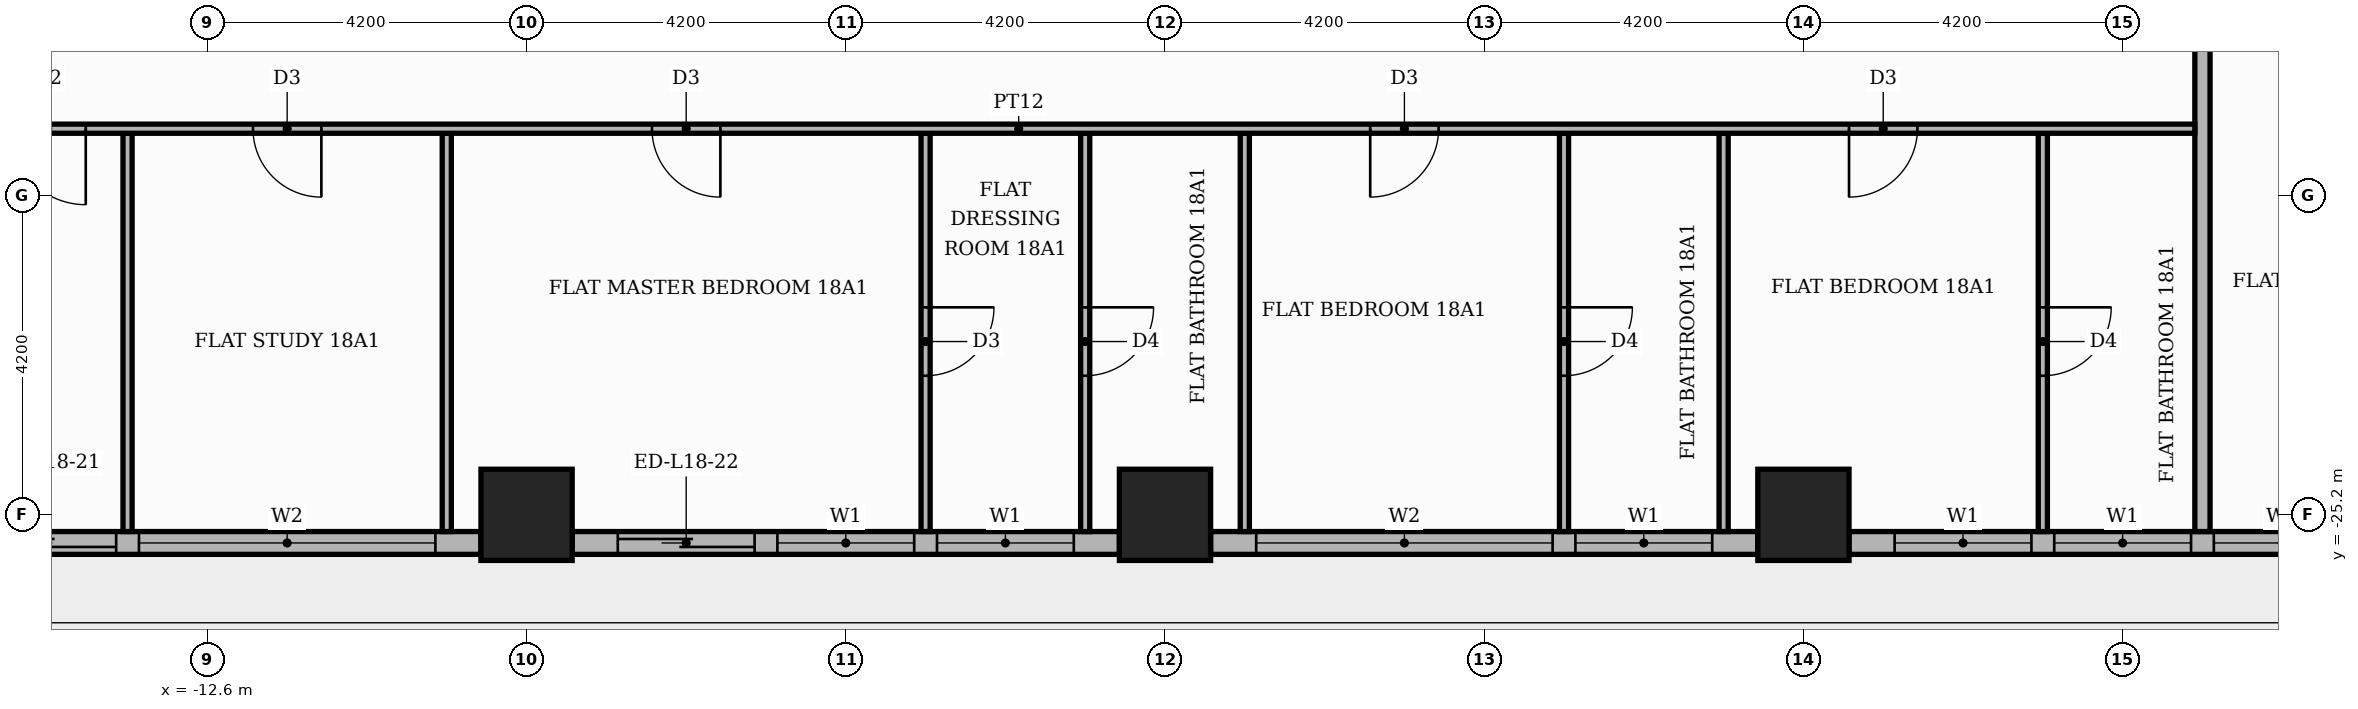
"""IFC4 building model, lengths in metres.
Left out: names, types, materials, properties, quantities, classifications, styles, units other than length and angle.
Written with IfcOpenShell. Run it as: python <this file> out.ifc"""

import sys

from ifc_helpers import new_model, si_unit, direction, frame, frame_2d, origin, origin_2d, place, context, subcontext, project, spatial, rectangle, extrude, element, fill, save


model = new_model("IFC4")
c1 = context("Model", 3, precision=1e-05, world=origin(), true_north=direction((0.0, 1.0)))
c2 = subcontext(c1, "Body", "Model", "MODEL_VIEW")
j1 = project(units=[si_unit("LENGTHUNIT", "METRE"), si_unit("PLANEANGLEUNIT", "RADIAN")], contexts=[c1])
p1 = place(None, origin())
s1 = spatial("IfcSite", under=j1, at=p1, CompositionType="ELEMENT")
p2 = place(p1, origin())
s2 = spatial("IfcBuilding", under=s1, at=p2, CompositionType="ELEMENT")
p3 = place(p2, frame((0.0, 0.0, 79.2)))
s3 = spatial("IfcBuildingStorey", under=s2, at=p3, CompositionType="ELEMENT", Elevation=79.2)
for number, where, z_axis, x_axis in (
    (1, (0.0, -25.2, -0.42), (0.0, 0.0, 1.0), (1.0, 0.0, 0.0)),
    (2, (8.4, -25.2, -0.42), (0.0, 0.0, 1.0), (1.0, 0.0, 0.0)),
    (3, (-8.4, -25.2, -0.42), (0.0, 0.0, 1.0), (1.0, 0.0, 0.0)),
):
    element("IfcColumn", number, at=place(p3, frame(where, z_axis=z_axis, x_axis=x_axis)), inside=s3, PredefinedType="COLUMN", context=c2, shape_type="SweptSolid", body=[
        extrude(rectangle(XDim=1.2, YDim=1.2, at=origin_2d()), origin(), (0.0, 0.0, 1.0), 4.32),
    ])
p4 = place(p3, frame((-16.2, -25.57, 0.0), z_axis=(0.0, 0.0, 1.0), x_axis=(1.0, 0.0, 0.0)))
e4 = element("IfcWall", 4, at=p4, inside=s3, PredefinedType="STANDARD", context=c2, shape_type="SweptSolid", body=[
    extrude(rectangle(XDim=7.2, YDim=0.3, at=frame_2d((3.6, 0.0))), origin(), (0.0, 0.0, 1.0), 3.48),
])
p5 = place(p4, frame((0.6, 0.0, 0.0)))
e5 = element("IfcOpeningElement", 5, at=p5, cuts=e4, PredefinedType="OPENING", context=c2, shape_type="SweptSolid", body=[
    extrude(rectangle(XDim=1.8, YDim=2.4, at=frame_2d((0.9, 1.2))), frame((0.0, 0.16, 0.0), z_axis=(0.0, -1.0, 0.0), x_axis=(1.0, 0.0, 0.0)), (0.0, 0.0, 1.0), 0.32),
])
p6 = place(p4, frame((2.7, 0.0, 0.9)))
e6 = element("IfcOpeningElement", 6, at=p6, cuts=e4, PredefinedType="OPENING", context=c2, shape_type="SweptSolid", body=[
    extrude(rectangle(XDim=3.9, YDim=2.1, at=frame_2d((1.95, 1.05))), frame((0.0, 0.16, 0.0), z_axis=(0.0, -1.0, 0.0), x_axis=(1.0, 0.0, 0.0)), (0.0, 0.0, 1.0), 0.32),
])
p7 = place(p3, frame((-7.8, -25.57, 0.0), z_axis=(0.0, 0.0, 1.0), x_axis=(1.0, 0.0, 0.0)))
e7 = element("IfcWall", 7, at=p7, inside=s3, PredefinedType="STANDARD", context=c2, shape_type="SweptSolid", body=[
    extrude(rectangle(XDim=7.2, YDim=0.3, at=frame_2d((3.6, 0.0))), origin(), (0.0, 0.0, 1.0), 3.48),
])
p8 = place(p7, frame((0.6, 0.0, 0.0)))
e8 = element("IfcOpeningElement", 8, at=p8, cuts=e7, PredefinedType="OPENING", context=c2, shape_type="SweptSolid", body=[
    extrude(rectangle(XDim=1.8, YDim=2.4, at=frame_2d((0.9, 1.2))), frame((0.0, 0.16, 0.0), z_axis=(0.0, -1.0, 0.0), x_axis=(1.0, 0.0, 0.0)), (0.0, 0.0, 1.0), 0.32),
])
p9 = place(p7, frame((2.7, 0.0, 0.9)))
e9 = element("IfcOpeningElement", 9, at=p9, cuts=e7, PredefinedType="OPENING", context=c2, shape_type="SweptSolid", body=[
    extrude(rectangle(XDim=1.8, YDim=2.1, at=frame_2d((0.9, 1.05))), frame((0.0, 0.16, 0.0), z_axis=(0.0, -1.0, 0.0), x_axis=(1.0, 0.0, 0.0)), (0.0, 0.0, 1.0), 0.32),
])
p10 = place(p7, frame((4.8, 0.0, 0.9)))
e10 = element("IfcOpeningElement", 10, at=p10, cuts=e7, PredefinedType="OPENING", context=c2, shape_type="SweptSolid", body=[
    extrude(rectangle(XDim=1.8, YDim=2.1, at=frame_2d((0.9, 1.05))), frame((0.0, 0.16, 0.0), z_axis=(0.0, -1.0, 0.0), x_axis=(1.0, 0.0, 0.0)), (0.0, 0.0, 1.0), 0.32),
])
p11 = place(p3, frame((0.6, -25.57, 0.0), z_axis=(0.0, 0.0, 1.0), x_axis=(1.0, 0.0, 0.0)))
e11 = element("IfcWall", 11, at=p11, inside=s3, PredefinedType="STANDARD", context=c2, shape_type="SweptSolid", body=[
    extrude(rectangle(XDim=7.2, YDim=0.3, at=frame_2d((3.6, 0.0))), origin(), (0.0, 0.0, 1.0), 3.48),
])
p12 = place(p11, frame((0.6, 0.0, 0.9)))
e12 = element("IfcOpeningElement", 12, at=p12, cuts=e11, PredefinedType="OPENING", context=c2, shape_type="SweptSolid", body=[
    extrude(rectangle(XDim=3.9, YDim=2.1, at=frame_2d((1.95, 1.05))), frame((0.0, 0.16, 0.0), z_axis=(0.0, -1.0, 0.0), x_axis=(1.0, 0.0, 0.0)), (0.0, 0.0, 1.0), 0.32),
])
p13 = place(p11, frame((4.8, 0.0, 0.9)))
e13 = element("IfcOpeningElement", 13, at=p13, cuts=e11, PredefinedType="OPENING", context=c2, shape_type="SweptSolid", body=[
    extrude(rectangle(XDim=1.8, YDim=2.1, at=frame_2d((0.9, 1.05))), frame((0.0, 0.16, 0.0), z_axis=(0.0, -1.0, 0.0), x_axis=(1.0, 0.0, 0.0)), (0.0, 0.0, 1.0), 0.32),
])
p14 = place(p3, frame((9.0, -25.57, 0.0), z_axis=(0.0, 0.0, 1.0), x_axis=(1.0, 0.0, 0.0)))
e14 = element("IfcWall", 14, at=p14, inside=s3, PredefinedType="STANDARD", context=c2, shape_type="SweptSolid", body=[
    extrude(rectangle(XDim=7.2, YDim=0.3, at=frame_2d((3.6, 0.0))), origin(), (0.0, 0.0, 1.0), 3.48),
])
p15 = place(p14, frame((0.6, 0.0, 0.9)))
e15 = element("IfcOpeningElement", 15, at=p15, cuts=e14, PredefinedType="OPENING", context=c2, shape_type="SweptSolid", body=[
    extrude(rectangle(XDim=1.8, YDim=2.1, at=frame_2d((0.9, 1.05))), frame((0.0, 0.16, 0.0), z_axis=(0.0, -1.0, 0.0), x_axis=(1.0, 0.0, 0.0)), (0.0, 0.0, 1.0), 0.32),
])
p16 = place(p14, frame((2.7, 0.0, 0.9)))
e16 = element("IfcOpeningElement", 16, at=p16, cuts=e14, PredefinedType="OPENING", context=c2, shape_type="SweptSolid", body=[
    extrude(rectangle(XDim=1.8, YDim=2.1, at=frame_2d((0.9, 1.05))), frame((0.0, 0.16, 0.0), z_axis=(0.0, -1.0, 0.0), x_axis=(1.0, 0.0, 0.0)), (0.0, 0.0, 1.0), 0.32),
])
p17 = place(p14, frame((4.8, 0.0, 0.9)))
e17 = element("IfcOpeningElement", 17, at=p17, cuts=e14, PredefinedType="OPENING", context=c2, shape_type="SweptSolid", body=[
    extrude(rectangle(XDim=1.8, YDim=2.1, at=frame_2d((0.9, 1.05))), frame((0.0, 0.16, 0.0), z_axis=(0.0, -1.0, 0.0), x_axis=(1.0, 0.0, 0.0)), (0.0, 0.0, 1.0), 0.32),
])
for number, where, z_axis, x_axis in (
    (18, (-13.65, -25.42, 0.0), (0.0, 0.0, 1.0), (0.0, 1.0, 0.0)),
    (19, (-9.45, -25.42, 0.0), (0.0, 0.0, 1.0), (0.0, 1.0, 0.0)),
):
    element("IfcWall", number, at=place(p3, frame(where, z_axis=z_axis, x_axis=x_axis)), inside=s3, PredefinedType="PARTITIONING", context=c2, shape_type="SweptSolid", body=[
        extrude(rectangle(XDim=5.24, YDim=0.12, at=frame_2d((2.62, 0.0))), origin(), (0.0, 0.0, 1.0), 3.48),
    ])
p18 = place(p3, frame((-3.15, -25.42, 0.0), z_axis=(0.0, 0.0, 1.0), x_axis=(0.0, 1.0, 0.0)))
e20 = element("IfcWall", 20, at=p18, inside=s3, PredefinedType="PARTITIONING", context=c2, shape_type="SweptSolid", body=[
    extrude(rectangle(XDim=5.24, YDim=0.12, at=frame_2d((2.62, 0.0))), origin(), (0.0, 0.0, 1.0), 3.48),
])
p19 = place(p18, frame((2.05, 0.0, 0.0)))
e21 = element("IfcOpeningElement", 21, at=p19, cuts=e20, PredefinedType="OPENING", context=c2, shape_type="SweptSolid", body=[
    extrude(rectangle(XDim=0.9, YDim=2.1, at=frame_2d((0.45, 1.05))), frame((0.0, 0.07, 0.0), z_axis=(0.0, -1.0, 0.0), x_axis=(1.0, 0.0, 0.0)), (0.0, 0.0, 1.0), 0.14),
])
p20 = place(p3, frame((-1.05, -25.42, 0.0), z_axis=(0.0, 0.0, 1.0), x_axis=(0.0, 1.0, 0.0)))
e22 = element("IfcWall", 22, at=p20, inside=s3, PredefinedType="PARTITIONING", context=c2, shape_type="SweptSolid", body=[
    extrude(rectangle(XDim=5.24, YDim=0.12, at=frame_2d((2.62, 0.0))), origin(), (0.0, 0.0, 1.0), 3.48),
])
p21 = place(p20, frame((2.05, 0.0, 0.0)))
e23 = element("IfcOpeningElement", 23, at=p21, cuts=e22, PredefinedType="OPENING", context=c2, shape_type="SweptSolid", body=[
    extrude(rectangle(XDim=0.9, YDim=2.1, at=frame_2d((0.45, 1.05))), frame((0.0, 0.07, 0.0), z_axis=(0.0, -1.0, 0.0), x_axis=(1.0, 0.0, 0.0)), (0.0, 0.0, 1.0), 0.14),
])
p22 = place(p3, frame((1.05, -25.42, 0.0), z_axis=(0.0, 0.0, 1.0), x_axis=(0.0, 1.0, 0.0)))
e24 = element("IfcWall", 24, at=p22, inside=s3, PredefinedType="PARTITIONING", context=c2, shape_type="SweptSolid", body=[
    extrude(rectangle(XDim=5.24, YDim=0.12, at=frame_2d((2.62, 0.0))), origin(), (0.0, 0.0, 1.0), 3.48),
])
p23 = place(p3, frame((5.25, -25.42, 0.0), z_axis=(0.0, 0.0, 1.0), x_axis=(0.0, 1.0, 0.0)))
e25 = element("IfcWall", 25, at=p23, inside=s3, PredefinedType="PARTITIONING", context=c2, shape_type="SweptSolid", body=[
    extrude(rectangle(XDim=5.24, YDim=0.12, at=frame_2d((2.62, 0.0))), origin(), (0.0, 0.0, 1.0), 3.48),
])
p24 = place(p23, frame((2.05, 0.0, 0.0)))
e26 = element("IfcOpeningElement", 26, at=p24, cuts=e25, PredefinedType="OPENING", context=c2, shape_type="SweptSolid", body=[
    extrude(rectangle(XDim=0.9, YDim=2.1, at=frame_2d((0.45, 1.05))), frame((0.0, 0.07, 0.0), z_axis=(0.0, -1.0, 0.0), x_axis=(1.0, 0.0, 0.0)), (0.0, 0.0, 1.0), 0.14),
])
p25 = place(p3, frame((7.35, -25.42, 0.0), z_axis=(0.0, 0.0, 1.0), x_axis=(0.0, 1.0, 0.0)))
e27 = element("IfcWall", 27, at=p25, inside=s3, PredefinedType="PARTITIONING", context=c2, shape_type="SweptSolid", body=[
    extrude(rectangle(XDim=5.24, YDim=0.12, at=frame_2d((2.62, 0.0))), origin(), (0.0, 0.0, 1.0), 3.48),
])
p26 = place(p3, frame((11.55, -25.42, 0.0), z_axis=(0.0, 0.0, 1.0), x_axis=(0.0, 1.0, 0.0)))
e28 = element("IfcWall", 28, at=p26, inside=s3, PredefinedType="PARTITIONING", context=c2, shape_type="SweptSolid", body=[
    extrude(rectangle(XDim=5.24, YDim=0.12, at=frame_2d((2.62, 0.0))), origin(), (0.0, 0.0, 1.0), 3.48),
])
p27 = place(p26, frame((2.05, 0.0, 0.0)))
e29 = element("IfcOpeningElement", 29, at=p27, cuts=e28, PredefinedType="OPENING", context=c2, shape_type="SweptSolid", body=[
    extrude(rectangle(XDim=0.9, YDim=2.1, at=frame_2d((0.45, 1.05))), frame((0.0, 0.07, 0.0), z_axis=(0.0, -1.0, 0.0), x_axis=(1.0, 0.0, 0.0)), (0.0, 0.0, 1.0), 0.14),
])
p28 = place(p3, frame((13.65, -25.42, 0.0), z_axis=(0.0, 0.0, 1.0), x_axis=(0.0, 1.0, 0.0)))
e30 = element("IfcWall", 30, at=p28, inside=s3, PredefinedType="PARTITIONING", context=c2, shape_type="SweptSolid", body=[
    extrude(rectangle(XDim=11.67, YDim=0.2, at=frame_2d((5.835, 0.0))), origin(), (0.0, 0.0, 1.0), 3.48),
])
p29 = place(p3, frame((-17.4, -20.12, 0.0), z_axis=(0.0, 0.0, 1.0), x_axis=(1.0, 0.0, 0.0)))
e31 = element("IfcWall", 31, at=p29, inside=s3, PredefinedType="PARTITIONING", context=c2, shape_type="SweptSolid", body=[
    extrude(rectangle(XDim=30.95, YDim=0.12, at=frame_2d((15.475, 0.0))), origin(), (0.0, 0.0, 1.0), 3.48),
])
p30 = place(p29, frame((2.2, 0.0, 0.0)))
e32 = element("IfcOpeningElement", 32, at=p30, cuts=e31, PredefinedType="OPENING", context=c2, shape_type="SweptSolid", body=[
    extrude(rectangle(XDim=1.0, YDim=2.1, at=frame_2d((0.5, 1.05))), frame((0.0, 0.07, 0.0), z_axis=(0.0, -1.0, 0.0), x_axis=(1.0, 0.0, 0.0)), (0.0, 0.0, 1.0), 0.14),
])
p31 = place(p29, frame((5.4, 0.0, 0.0)))
e33 = element("IfcOpeningElement", 33, at=p31, cuts=e31, PredefinedType="OPENING", context=c2, shape_type="SweptSolid", body=[
    extrude(rectangle(XDim=0.9, YDim=2.1, at=frame_2d((0.45, 1.05))), frame((0.0, 0.07, 0.0), z_axis=(0.0, -1.0, 0.0), x_axis=(1.0, 0.0, 0.0)), (0.0, 0.0, 1.0), 0.14),
])
p32 = place(p29, frame((10.65, 0.0, 0.0)))
e34 = element("IfcOpeningElement", 34, at=p32, cuts=e31, PredefinedType="OPENING", context=c2, shape_type="SweptSolid", body=[
    extrude(rectangle(XDim=0.9, YDim=2.1, at=frame_2d((0.45, 1.05))), frame((0.0, 0.07, 0.0), z_axis=(0.0, -1.0, 0.0), x_axis=(1.0, 0.0, 0.0)), (0.0, 0.0, 1.0), 0.14),
])
p33 = place(p29, frame((20.1, 0.0, 0.0)))
e35 = element("IfcOpeningElement", 35, at=p33, cuts=e31, PredefinedType="OPENING", context=c2, shape_type="SweptSolid", body=[
    extrude(rectangle(XDim=0.9, YDim=2.1, at=frame_2d((0.45, 1.05))), frame((0.0, 0.07, 0.0), z_axis=(0.0, -1.0, 0.0), x_axis=(1.0, 0.0, 0.0)), (0.0, 0.0, 1.0), 0.14),
])
p34 = place(p29, frame((26.4, 0.0, 0.0)))
e36 = element("IfcOpeningElement", 36, at=p34, cuts=e31, PredefinedType="OPENING", context=c2, shape_type="SweptSolid", body=[
    extrude(rectangle(XDim=0.9, YDim=2.1, at=frame_2d((0.45, 1.05))), frame((0.0, 0.07, 0.0), z_axis=(0.0, -1.0, 0.0), x_axis=(1.0, 0.0, 0.0)), (0.0, 0.0, 1.0), 0.14),
])
p35 = place(p5, origin())
e37 = element("IfcDoor", 37, at=p35, inside=s3, OperationType="SLIDING_TO_LEFT", PredefinedType="DOOR", context=c2, shape_type="SweptSolid", body=[
    extrude(rectangle(XDim=1.8, YDim=2.4, at=frame_2d((0.9, 1.2))), frame((0.0, 0.025, 0.0), z_axis=(0.0, -1.0, 0.0), x_axis=(1.0, 0.0, 0.0)), (0.0, 0.0, 1.0), 0.05),
])
fill(e5, e37)
p36 = place(p6, origin())
e38 = element("IfcWindow", 38, at=p36, inside=s3, PartitioningType="SINGLE_PANEL", PredefinedType="WINDOW", context=c2, shape_type="SweptSolid", body=[
    extrude(rectangle(XDim=3.9, YDim=2.1, at=frame_2d((1.95, 1.05))), frame((0.0, 0.03, 0.0), z_axis=(0.0, -1.0, 0.0), x_axis=(1.0, 0.0, 0.0)), (0.0, 0.0, 1.0), 0.06),
])
fill(e6, e38)
p37 = place(p8, origin())
e39 = element("IfcDoor", 39, at=p37, inside=s3, OperationType="SLIDING_TO_LEFT", PredefinedType="DOOR", context=c2, shape_type="SweptSolid", body=[
    extrude(rectangle(XDim=1.8, YDim=2.4, at=frame_2d((0.9, 1.2))), frame((0.0, 0.025, 0.0), z_axis=(0.0, -1.0, 0.0), x_axis=(1.0, 0.0, 0.0)), (0.0, 0.0, 1.0), 0.05),
])
fill(e8, e39)
p38 = place(p9, origin())
e40 = element("IfcWindow", 40, at=p38, inside=s3, PartitioningType="SINGLE_PANEL", PredefinedType="WINDOW", context=c2, shape_type="SweptSolid", body=[
    extrude(rectangle(XDim=1.8, YDim=2.1, at=frame_2d((0.9, 1.05))), frame((0.0, 0.03, 0.0), z_axis=(0.0, -1.0, 0.0), x_axis=(1.0, 0.0, 0.0)), (0.0, 0.0, 1.0), 0.06),
])
fill(e9, e40)
p39 = place(p10, origin())
e41 = element("IfcWindow", 41, at=p39, inside=s3, PartitioningType="SINGLE_PANEL", PredefinedType="WINDOW", context=c2, shape_type="SweptSolid", body=[
    extrude(rectangle(XDim=1.8, YDim=2.1, at=frame_2d((0.9, 1.05))), frame((0.0, 0.03, 0.0), z_axis=(0.0, -1.0, 0.0), x_axis=(1.0, 0.0, 0.0)), (0.0, 0.0, 1.0), 0.06),
])
fill(e10, e41)
p40 = place(p12, origin())
e42 = element("IfcWindow", 42, at=p40, inside=s3, PartitioningType="SINGLE_PANEL", PredefinedType="WINDOW", context=c2, shape_type="SweptSolid", body=[
    extrude(rectangle(XDim=3.9, YDim=2.1, at=frame_2d((1.95, 1.05))), frame((0.0, 0.03, 0.0), z_axis=(0.0, -1.0, 0.0), x_axis=(1.0, 0.0, 0.0)), (0.0, 0.0, 1.0), 0.06),
])
fill(e12, e42)
p41 = place(p13, origin())
e43 = element("IfcWindow", 43, at=p41, inside=s3, PartitioningType="SINGLE_PANEL", PredefinedType="WINDOW", context=c2, shape_type="SweptSolid", body=[
    extrude(rectangle(XDim=1.8, YDim=2.1, at=frame_2d((0.9, 1.05))), frame((0.0, 0.03, 0.0), z_axis=(0.0, -1.0, 0.0), x_axis=(1.0, 0.0, 0.0)), (0.0, 0.0, 1.0), 0.06),
])
fill(e13, e43)
p42 = place(p15, origin())
e44 = element("IfcWindow", 44, at=p42, inside=s3, PartitioningType="SINGLE_PANEL", PredefinedType="WINDOW", context=c2, shape_type="SweptSolid", body=[
    extrude(rectangle(XDim=1.8, YDim=2.1, at=frame_2d((0.9, 1.05))), frame((0.0, 0.03, 0.0), z_axis=(0.0, -1.0, 0.0), x_axis=(1.0, 0.0, 0.0)), (0.0, 0.0, 1.0), 0.06),
])
fill(e15, e44)
p43 = place(p16, origin())
e45 = element("IfcWindow", 45, at=p43, inside=s3, PartitioningType="SINGLE_PANEL", PredefinedType="WINDOW", context=c2, shape_type="SweptSolid", body=[
    extrude(rectangle(XDim=1.8, YDim=2.1, at=frame_2d((0.9, 1.05))), frame((0.0, 0.03, 0.0), z_axis=(0.0, -1.0, 0.0), x_axis=(1.0, 0.0, 0.0)), (0.0, 0.0, 1.0), 0.06),
])
fill(e16, e45)
p44 = place(p17, origin())
e46 = element("IfcWindow", 46, at=p44, inside=s3, PartitioningType="SINGLE_PANEL", PredefinedType="WINDOW", context=c2, shape_type="SweptSolid", body=[
    extrude(rectangle(XDim=1.8, YDim=2.1, at=frame_2d((0.9, 1.05))), frame((0.0, 0.03, 0.0), z_axis=(0.0, -1.0, 0.0), x_axis=(1.0, 0.0, 0.0)), (0.0, 0.0, 1.0), 0.06),
])
fill(e17, e46)
p45 = place(p30, frame((1.0, 0.0, 0.0), z_axis=(0.0, 0.0, 1.0), x_axis=(-1.0, 0.0, 0.0)))
e47 = element("IfcDoor", 47, at=p45, inside=s3, OperationType="SINGLE_SWING_RIGHT", PredefinedType="DOOR", context=c2, shape_type="SweptSolid", body=[
    extrude(rectangle(XDim=1.0, YDim=2.1, at=frame_2d((0.5, 1.05))), frame((0.0, 0.025, 0.0), z_axis=(0.0, -1.0, 0.0), x_axis=(1.0, 0.0, 0.0)), (0.0, 0.0, 1.0), 0.05),
])
fill(e32, e47)
p46 = place(p31, frame((0.9, 0.0, 0.0), z_axis=(0.0, 0.0, 1.0), x_axis=(-1.0, 0.0, 0.0)))
e48 = element("IfcDoor", 48, at=p46, inside=s3, OperationType="SINGLE_SWING_RIGHT", PredefinedType="DOOR", context=c2, shape_type="SweptSolid", body=[
    extrude(rectangle(XDim=0.9, YDim=2.1, at=frame_2d((0.45, 1.05))), frame((0.0, 0.025, 0.0), z_axis=(0.0, -1.0, 0.0), x_axis=(1.0, 0.0, 0.0)), (0.0, 0.0, 1.0), 0.05),
])
fill(e33, e48)
p47 = place(p32, frame((0.9, 0.0, 0.0), z_axis=(0.0, 0.0, 1.0), x_axis=(-1.0, 0.0, 0.0)))
e49 = element("IfcDoor", 49, at=p47, inside=s3, OperationType="SINGLE_SWING_RIGHT", PredefinedType="DOOR", context=c2, shape_type="SweptSolid", body=[
    extrude(rectangle(XDim=0.9, YDim=2.1, at=frame_2d((0.45, 1.05))), frame((0.0, 0.025, 0.0), z_axis=(0.0, -1.0, 0.0), x_axis=(1.0, 0.0, 0.0)), (0.0, 0.0, 1.0), 0.05),
])
fill(e34, e49)
p48 = place(p19, frame((0.9, 0.0, 0.0), z_axis=(0.0, 0.0, 1.0), x_axis=(-1.0, 0.0, 0.0)))
e50 = element("IfcDoor", 50, at=p48, inside=s3, OperationType="SINGLE_SWING_RIGHT", PredefinedType="DOOR", context=c2, shape_type="SweptSolid", body=[
    extrude(rectangle(XDim=0.9, YDim=2.1, at=frame_2d((0.45, 1.05))), frame((0.0, 0.025, 0.0), z_axis=(0.0, -1.0, 0.0), x_axis=(1.0, 0.0, 0.0)), (0.0, 0.0, 1.0), 0.05),
])
fill(e21, e50)
p49 = place(p21, frame((0.9, 0.0, 0.0), z_axis=(0.0, 0.0, 1.0), x_axis=(-1.0, 0.0, 0.0)))
e51 = element("IfcDoor", 51, at=p49, inside=s3, OperationType="SINGLE_SWING_RIGHT", PredefinedType="DOOR", context=c2, shape_type="SweptSolid", body=[
    extrude(rectangle(XDim=0.9, YDim=2.1, at=frame_2d((0.45, 1.05))), frame((0.0, 0.025, 0.0), z_axis=(0.0, -1.0, 0.0), x_axis=(1.0, 0.0, 0.0)), (0.0, 0.0, 1.0), 0.05),
])
fill(e23, e51)
p50 = place(p33, frame((0.9, 0.0, 0.0), z_axis=(0.0, 0.0, 1.0), x_axis=(-1.0, 0.0, 0.0)))
e52 = element("IfcDoor", 52, at=p50, inside=s3, OperationType="SINGLE_SWING_LEFT", PredefinedType="DOOR", context=c2, shape_type="SweptSolid", body=[
    extrude(rectangle(XDim=0.9, YDim=2.1, at=frame_2d((0.45, 1.05))), frame((0.0, 0.025, 0.0), z_axis=(0.0, -1.0, 0.0), x_axis=(1.0, 0.0, 0.0)), (0.0, 0.0, 1.0), 0.05),
])
fill(e35, e52)
p51 = place(p24, frame((0.9, 0.0, 0.0), z_axis=(0.0, 0.0, 1.0), x_axis=(-1.0, 0.0, 0.0)))
e53 = element("IfcDoor", 53, at=p51, inside=s3, OperationType="SINGLE_SWING_RIGHT", PredefinedType="DOOR", context=c2, shape_type="SweptSolid", body=[
    extrude(rectangle(XDim=0.9, YDim=2.1, at=frame_2d((0.45, 1.05))), frame((0.0, 0.025, 0.0), z_axis=(0.0, -1.0, 0.0), x_axis=(1.0, 0.0, 0.0)), (0.0, 0.0, 1.0), 0.05),
])
fill(e26, e53)
p52 = place(p34, frame((0.9, 0.0, 0.0), z_axis=(0.0, 0.0, 1.0), x_axis=(-1.0, 0.0, 0.0)))
e54 = element("IfcDoor", 54, at=p52, inside=s3, OperationType="SINGLE_SWING_LEFT", PredefinedType="DOOR", context=c2, shape_type="SweptSolid", body=[
    extrude(rectangle(XDim=0.9, YDim=2.1, at=frame_2d((0.45, 1.05))), frame((0.0, 0.025, 0.0), z_axis=(0.0, -1.0, 0.0), x_axis=(1.0, 0.0, 0.0)), (0.0, 0.0, 1.0), 0.05),
])
fill(e36, e54)
p53 = place(p27, frame((0.9, 0.0, 0.0), z_axis=(0.0, 0.0, 1.0), x_axis=(-1.0, 0.0, 0.0)))
e55 = element("IfcDoor", 55, at=p53, inside=s3, OperationType="SINGLE_SWING_RIGHT", PredefinedType="DOOR", context=c2, shape_type="SweptSolid", body=[
    extrude(rectangle(XDim=0.9, YDim=2.1, at=frame_2d((0.45, 1.05))), frame((0.0, 0.025, 0.0), z_axis=(0.0, -1.0, 0.0), x_axis=(1.0, 0.0, 0.0)), (0.0, 0.0, 1.0), 0.05),
])
fill(e29, e55)
save(model, sys.argv[1])
